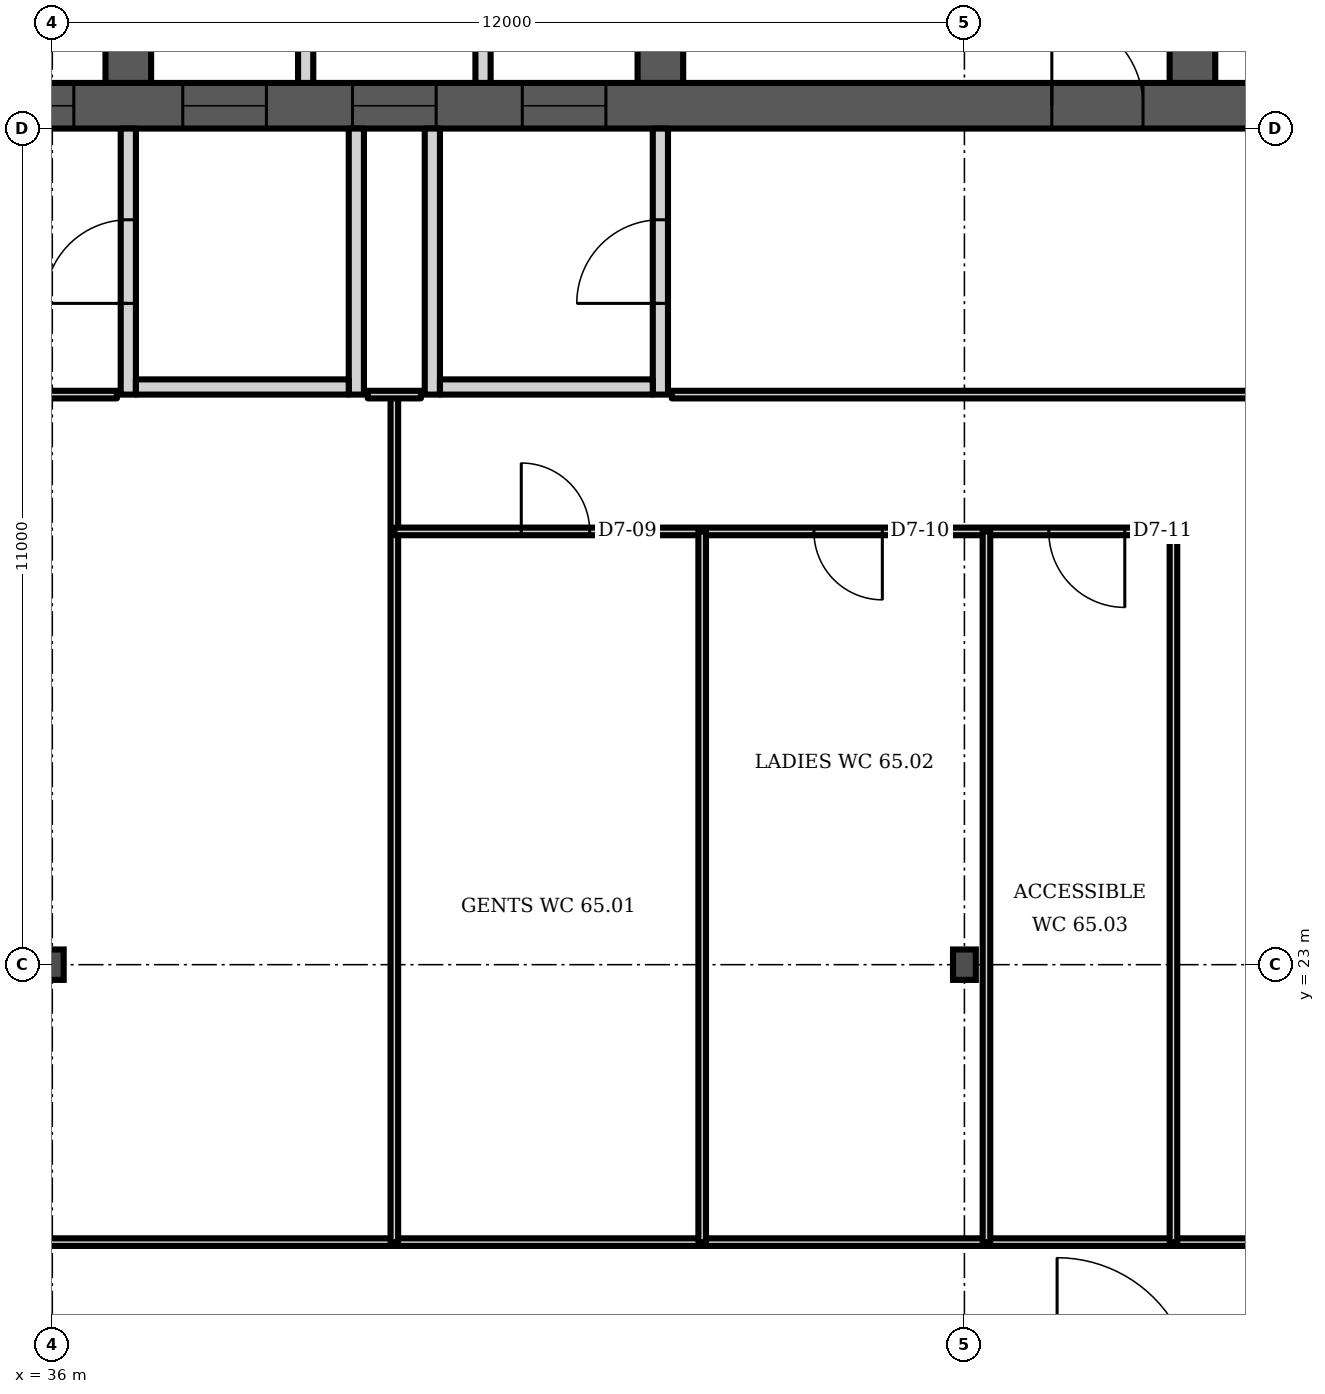
"""IFC4 building model, lengths in metres.
Left out: names, types, materials, properties, quantities, classifications, styles, units other than length and angle.
Written with IfcOpenShell. Run it as: python <this file> out.ifc"""

import sys

from ifc_helpers import new_model, si_unit, direction, frame, frame_2d, origin, origin_2d, place, context, subcontext, project, spatial, polyline, rectangle, i_section, outline, extrude, element, fill, save


model = new_model("IFC4")
c1 = context("Model", 3, precision=1e-05, world=origin(), true_north=direction((0.0, 1.0)))
c2 = subcontext(c1, "Body", "Model", "MODEL_VIEW")
j1 = project(units=[si_unit("LENGTHUNIT", "METRE"), si_unit("PLANEANGLEUNIT", "RADIAN")], contexts=[c1])
p1 = place(None, origin())
s1 = spatial("IfcSite", under=j1, at=p1, CompositionType="ELEMENT")
p2 = place(p1, origin())
s2 = spatial("IfcBuilding", under=s1, at=p2, CompositionType="ELEMENT")
p3 = place(p2, frame((0.0, 0.0, 257.5)))
s3 = spatial("IfcBuildingStorey", under=s2, at=p3, CompositionType="ELEMENT", Elevation=257.5)
p4 = place(p3, frame((23.0, 34.3, 0.0), z_axis=(0.0, 0.0, 1.0), x_axis=(1.0, 0.0, 0.0)))
e1 = element("IfcWall", 1, at=p4, inside=s3, PredefinedType="SHEAR", context=c2, shape_type="SweptSolid", body=[
    extrude(rectangle(XDim=35.0, YDim=0.6, at=frame_2d((17.5, 0.0))), origin(), (0.0, 0.0, 1.0), 3.6),
])
p5 = place(p4, frame((0.65, 0.0, 0.0)))
e2 = element("IfcOpeningElement", 2, at=p5, cuts=e1, PredefinedType="OPENING", context=c2, shape_type="SweptSolid", body=[
    extrude(rectangle(XDim=1.2, YDim=2.1, at=frame_2d((0.6, 1.05))), frame((0.0, 0.31, 0.0), z_axis=(0.0, -1.0, 0.0), x_axis=(1.0, 0.0, 0.0)), (0.0, 0.0, 1.0), 0.62),
])
p6 = place(p4, frame((7.717, 0.0, 0.0)))
e3 = element("IfcOpeningElement", 3, at=p6, cuts=e1, PredefinedType="OPENING", context=c2, shape_type="SweptSolid", body=[
    extrude(rectangle(XDim=1.1, YDim=2.1, at=frame_2d((0.55, 1.05))), frame((0.0, 0.31, 0.0), z_axis=(0.0, -1.0, 0.0), x_axis=(1.0, 0.0, 0.0)), (0.0, 0.0, 1.0), 0.62),
])
p7 = place(p4, frame((12.183, 0.0, 0.0)))
e4 = element("IfcOpeningElement", 4, at=p7, cuts=e1, PredefinedType="OPENING", context=c2, shape_type="SweptSolid", body=[
    extrude(rectangle(XDim=1.1, YDim=2.1, at=frame_2d((0.55, 1.05))), frame((0.0, 0.31, 0.0), z_axis=(0.0, -1.0, 0.0), x_axis=(1.0, 0.0, 0.0)), (0.0, 0.0, 1.0), 0.62),
])
p8 = place(p4, frame((9.8, 0.0, 0.0)))
e5 = element("IfcOpeningElement", 5, at=p8, cuts=e1, PredefinedType="OPENING", context=c2, shape_type="SweptSolid", body=[
    extrude(rectangle(XDim=1.4, YDim=2.1, at=frame_2d((0.7, 1.05))), frame((0.0, 0.31, 0.0), z_axis=(0.0, -1.0, 0.0), x_axis=(1.0, 0.0, 0.0)), (0.0, 0.0, 1.0), 0.62),
])
p9 = place(p4, frame((14.717, 0.0, 0.0)))
e6 = element("IfcOpeningElement", 6, at=p9, cuts=e1, PredefinedType="OPENING", context=c2, shape_type="SweptSolid", body=[
    extrude(rectangle(XDim=1.1, YDim=2.1, at=frame_2d((0.55, 1.05))), frame((0.0, 0.31, 0.0), z_axis=(0.0, -1.0, 0.0), x_axis=(1.0, 0.0, 0.0)), (0.0, 0.0, 1.0), 0.62),
])
p10 = place(p4, frame((16.95, 0.0, 0.0)))
e7 = element("IfcOpeningElement", 7, at=p10, cuts=e1, PredefinedType="OPENING", context=c2, shape_type="SweptSolid", body=[
    extrude(rectangle(XDim=1.1, YDim=2.1, at=frame_2d((0.55, 1.05))), frame((0.0, 0.31, 0.0), z_axis=(0.0, -1.0, 0.0), x_axis=(1.0, 0.0, 0.0)), (0.0, 0.0, 1.0), 0.62),
])
p11 = place(p4, frame((19.183, 0.0, 0.0)))
e8 = element("IfcOpeningElement", 8, at=p11, cuts=e1, PredefinedType="OPENING", context=c2, shape_type="SweptSolid", body=[
    extrude(rectangle(XDim=1.1, YDim=2.1, at=frame_2d((0.55, 1.05))), frame((0.0, 0.31, 0.0), z_axis=(0.0, -1.0, 0.0), x_axis=(1.0, 0.0, 0.0)), (0.0, 0.0, 1.0), 0.62),
])
p12 = place(p4, frame((26.15, 0.0, 0.0)))
e9 = element("IfcOpeningElement", 9, at=p12, cuts=e1, PredefinedType="OPENING", context=c2, shape_type="SweptSolid", body=[
    extrude(rectangle(XDim=1.2, YDim=2.1, at=frame_2d((0.6, 1.05))), frame((0.0, 0.31, 0.0), z_axis=(0.0, -1.0, 0.0), x_axis=(1.0, 0.0, 0.0)), (0.0, 0.0, 1.0), 0.62),
])
p13 = place(p4, frame((30.8, 0.0, 0.0)))
e10 = element("IfcOpeningElement", 10, at=p13, cuts=e1, PredefinedType="OPENING", context=c2, shape_type="SweptSolid", body=[
    extrude(rectangle(XDim=1.4, YDim=2.1, at=frame_2d((0.7, 1.05))), frame((0.0, 0.31, 0.0), z_axis=(0.0, -1.0, 0.0), x_axis=(1.0, 0.0, 0.0)), (0.0, 0.0, 1.0), 0.62),
])
p14 = place(p3, frame((37.0, 34.6, 0.0), z_axis=(0.0, 0.0, 1.0), x_axis=(0.0, 1.0, 0.0)))
e11 = element("IfcWall", 11, at=p14, inside=s3, PredefinedType="SHEAR", context=c2, shape_type="SweptSolid", body=[
    extrude(rectangle(XDim=14.784, YDim=0.6, at=frame_2d((7.392, 0.0))), origin(), (0.0, 0.0, 1.0), 3.6),
])
p15 = place(p14, frame((11.302, 0.0, 0.0)))
e12 = element("IfcOpeningElement", 12, at=p15, cuts=e11, PredefinedType="OPENING", context=c2, shape_type="SweptSolid", body=[
    extrude(rectangle(XDim=1.0, YDim=2.1, at=frame_2d((0.5, 1.05))), frame((0.0, 0.31, 0.0), z_axis=(0.0, -1.0, 0.0), x_axis=(1.0, 0.0, 0.0)), (0.0, 0.0, 1.0), 0.62),
])
p16 = place(p14, frame((3.8, 0.0, 0.0)))
e13 = element("IfcOpeningElement", 13, at=p16, cuts=e11, PredefinedType="OPENING", context=c2, shape_type="SweptSolid", body=[
    extrude(rectangle(XDim=1.1, YDim=2.1, at=frame_2d((0.55, 1.05))), frame((0.0, 0.31, 0.0), z_axis=(0.0, -1.0, 0.0), x_axis=(1.0, 0.0, 0.0)), (0.0, 0.0, 1.0), 0.62),
])
p17 = place(p3, frame((44.0, 34.6, 0.0), z_axis=(0.0, 0.0, 1.0), x_axis=(0.0, 1.0, 0.0)))
e14 = element("IfcWall", 14, at=p17, inside=s3, PredefinedType="SHEAR", context=c2, shape_type="SweptSolid", body=[
    extrude(rectangle(XDim=14.784, YDim=0.6, at=frame_2d((7.392, 0.0))), origin(), (0.0, 0.0, 1.0), 3.6),
])
p18 = place(p17, frame((11.608, 0.0, 0.0)))
e15 = element("IfcOpeningElement", 15, at=p18, cuts=e14, PredefinedType="OPENING", context=c2, shape_type="SweptSolid", body=[
    extrude(rectangle(XDim=1.0, YDim=2.1, at=frame_2d((0.5, 1.05))), frame((0.0, 0.31, 0.0), z_axis=(0.0, -1.0, 0.0), x_axis=(1.0, 0.0, 0.0)), (0.0, 0.0, 1.0), 0.62),
])
p19 = place(p17, frame((3.8, 0.0, 0.0)))
e16 = element("IfcOpeningElement", 16, at=p19, cuts=e14, PredefinedType="OPENING", context=c2, shape_type="SweptSolid", body=[
    extrude(rectangle(XDim=1.1, YDim=2.1, at=frame_2d((0.55, 1.05))), frame((0.0, 0.31, 0.0), z_axis=(0.0, -1.0, 0.0), x_axis=(1.0, 0.0, 0.0)), (0.0, 0.0, 1.0), 0.62),
])
p20 = place(p3, frame((51.0, 34.6, 0.0), z_axis=(0.0, 0.0, 1.0), x_axis=(0.0, 1.0, 0.0)))
e17 = element("IfcWall", 17, at=p20, inside=s3, PredefinedType="SHEAR", context=c2, shape_type="SweptSolid", body=[
    extrude(rectangle(XDim=14.171, YDim=0.6, at=frame_2d((7.085, 0.0))), origin(), (0.0, 0.0, 1.0), 3.6),
])
p21 = place(p20, frame((3.8, 0.0, 0.0)))
e18 = element("IfcOpeningElement", 18, at=p21, cuts=e17, PredefinedType="OPENING", context=c2, shape_type="SweptSolid", body=[
    extrude(rectangle(XDim=1.1, YDim=2.1, at=frame_2d((0.55, 1.05))), frame((0.0, 0.31, 0.0), z_axis=(0.0, -1.0, 0.0), x_axis=(1.0, 0.0, 0.0)), (0.0, 0.0, 1.0), 0.62),
])
for number, where, z_axis, x_axis in (
    (19, (36.0, 23.0, 0.0), (0.0, 0.0, 1.0), (1.0, 0.0, 0.0)),
    (20, (48.0, 23.0, 0.0), (0.0, 0.0, 1.0), (1.0, 0.0, 0.0)),
):
    element("IfcColumn", number, at=place(p3, frame(where, z_axis=z_axis, x_axis=x_axis)), inside=s3, PredefinedType="COLUMN", context=c2, shape_type="SweptSolid", body=[
        extrude(i_section(OverallWidth=0.3, OverallDepth=0.4, WebThickness=0.013, FlangeThickness=0.024, FilletRadius=0.027, at=origin_2d()), origin(), (0.0, 0.0, 1.0), 3.6),
    ])
p22 = place(p3, frame((0.0, 0.0, -0.0)))
e21 = element("IfcWall", 21, at=p22, inside=s3, PredefinedType="PARTITIONING", context=c2, shape_type="SweptSolid", body=[
    extrude(outline(polyline([(34.567, 37.65), (34.767, 37.65), (36.7, 37.65), (36.7, 37.45), (34.767, 37.45), (34.767, 34.6), (34.567, 34.6), (34.567, 37.65)])), origin(), (0.0, 0.0, 1.0), 3.2),
])
p23 = place(p3, frame((0.0, 0.0, -0.0)))
e22 = element("IfcWall", 22, at=p23, inside=s3, PredefinedType="PARTITIONING", context=c2, shape_type="SweptSolid", body=[
    extrude(outline(polyline([(41.567, 37.1), (39.433, 37.1), (39.433, 34.6), (39.233, 34.6), (39.233, 37.45), (37.3, 37.45), (37.3, 37.65), (39.233, 37.65), (39.433, 37.65), (39.433, 37.3), (41.567, 37.3), (41.567, 37.35), (41.767, 37.35), (43.7, 37.35), (43.7, 37.15), (41.767, 37.15), (41.767, 34.6), (41.567, 34.6), (41.567, 37.1)])), origin(), (0.0, 0.0, 1.0), 3.2),
])
p24 = place(p3, frame((37.0, 30.5, 0.0), z_axis=(0.0, 0.0, 1.0), x_axis=(0.0, 1.0, 0.0)))
e23 = element("IfcWall", 23, at=p24, inside=s3, PredefinedType="PARTITIONING", context=c2, shape_type="SweptSolid", body=[
    extrude(rectangle(XDim=3.5, YDim=0.2, at=frame_2d((1.75, 0.0))), origin(), (0.0, 0.0, 1.0), 3.2),
])
p25 = place(p24, frame((1.2, 0.0, 0.0)))
e24 = element("IfcOpeningElement", 24, at=p25, cuts=e23, PredefinedType="OPENING", context=c2, shape_type="SweptSolid", body=[
    extrude(rectangle(XDim=1.1, YDim=2.1, at=frame_2d((0.55, 1.05))), frame((0.0, 0.11, 0.0), z_axis=(0.0, -1.0, 0.0), x_axis=(1.0, 0.0, 0.0)), (0.0, 0.0, 1.0), 0.22),
])
p26 = place(p3, frame((40.0, 30.5, 0.0), z_axis=(0.0, 0.0, 1.0), x_axis=(0.0, 1.0, 0.0)))
e25 = element("IfcWall", 25, at=p26, inside=s3, PredefinedType="PARTITIONING", context=c2, shape_type="SweptSolid", body=[
    extrude(rectangle(XDim=3.5, YDim=0.2, at=frame_2d((1.75, 0.0))), origin(), (0.0, 0.0, 1.0), 3.2),
])
p27 = place(p3, frame((37.1, 30.6, 0.0), z_axis=(0.0, 0.0, 1.0), x_axis=(1.0, 0.0, 0.0)))
e26 = element("IfcWall", 26, at=p27, inside=s3, PredefinedType="PARTITIONING", context=c2, shape_type="SweptSolid", body=[
    extrude(rectangle(XDim=2.8, YDim=0.2, at=frame_2d((1.4, 0.0))), origin(), (0.0, 0.0, 1.0), 3.2),
])
p28 = place(p3, frame((41.0, 30.5, 0.0), z_axis=(0.0, 0.0, 1.0), x_axis=(0.0, 1.0, 0.0)))
e27 = element("IfcWall", 27, at=p28, inside=s3, PredefinedType="PARTITIONING", context=c2, shape_type="SweptSolid", body=[
    extrude(rectangle(XDim=3.5, YDim=0.2, at=frame_2d((1.75, 0.0))), origin(), (0.0, 0.0, 1.0), 3.2),
])
p29 = place(p3, frame((44.0, 30.5, 0.0), z_axis=(0.0, 0.0, 1.0), x_axis=(0.0, 1.0, 0.0)))
e28 = element("IfcWall", 28, at=p29, inside=s3, PredefinedType="PARTITIONING", context=c2, shape_type="SweptSolid", body=[
    extrude(rectangle(XDim=3.5, YDim=0.2, at=frame_2d((1.75, 0.0))), origin(), (0.0, 0.0, 1.0), 3.2),
])
p30 = place(p29, frame((1.2, 0.0, 0.0)))
e29 = element("IfcOpeningElement", 29, at=p30, cuts=e28, PredefinedType="OPENING", context=c2, shape_type="SweptSolid", body=[
    extrude(rectangle(XDim=1.1, YDim=2.1, at=frame_2d((0.55, 1.05))), frame((0.0, 0.11, 0.0), z_axis=(0.0, -1.0, 0.0), x_axis=(1.0, 0.0, 0.0)), (0.0, 0.0, 1.0), 0.22),
])
p31 = place(p3, frame((41.1, 30.6, 0.0), z_axis=(0.0, 0.0, 1.0), x_axis=(1.0, 0.0, 0.0)))
e30 = element("IfcWall", 30, at=p31, inside=s3, PredefinedType="PARTITIONING", context=c2, shape_type="SweptSolid", body=[
    extrude(rectangle(XDim=2.8, YDim=0.2, at=frame_2d((1.4, 0.0))), origin(), (0.0, 0.0, 1.0), 3.2),
])
p32 = place(p3, frame((23.0, 30.5, 0.0), z_axis=(0.0, 0.0, 1.0), x_axis=(1.0, 0.0, 0.0)))
e31 = element("IfcWall", 31, at=p32, inside=s3, PredefinedType="PARTITIONING", context=c2, shape_type="SweptSolid", body=[
    extrude(rectangle(XDim=13.85, YDim=0.1, at=frame_2d((6.925, 0.0))), origin(), (0.0, 0.0, 1.0), 3.2),
])
p33 = place(p32, frame((7.545, 0.0, 0.0)))
e32 = element("IfcOpeningElement", 32, at=p33, cuts=e31, PredefinedType="OPENING", context=c2, shape_type="SweptSolid", body=[
    extrude(rectangle(XDim=1.0, YDim=2.1, at=frame_2d((0.5, 1.05))), frame((0.0, 0.06, 0.0), z_axis=(0.0, -1.0, 0.0), x_axis=(1.0, 0.0, 0.0)), (0.0, 0.0, 1.0), 0.12),
])
p34 = place(p3, frame((25.125, 19.35, 0.0), z_axis=(0.0, 0.0, 1.0), x_axis=(1.0, 0.0, 0.0)))
e33 = element("IfcWall", 33, at=p34, inside=s3, PredefinedType="PARTITIONING", context=c2, shape_type="SweptSolid", body=[
    extrude(rectangle(XDim=31.475, YDim=0.1, at=frame_2d((15.738, 0.0))), origin(), (0.0, 0.0, 1.0), 3.2),
])
p35 = place(p3, frame((40.5, 19.35, 0.0), z_axis=(0.0, 0.0, 1.0), x_axis=(0.0, 1.0, 0.0)))
e34 = element("IfcWall", 34, at=p35, inside=s3, PredefinedType="PARTITIONING", context=c2, shape_type="SweptSolid", body=[
    extrude(rectangle(XDim=11.14, YDim=0.1, at=frame_2d((5.57, 0.0))), origin(), (0.0, 0.0, 1.0), 3.2),
])
p36 = place(p3, frame((40.5, 28.7, 0.0), z_axis=(0.0, 0.0, 1.0), x_axis=(1.0, 0.0, 0.0)))
e35 = element("IfcWall", 35, at=p36, inside=s3, PredefinedType="PARTITIONING", context=c2, shape_type="SweptSolid", body=[
    extrude(rectangle(XDim=10.25, YDim=0.1, at=frame_2d((5.125, 0.0))), origin(), (0.0, 0.0, 1.0), 3.2),
])
p37 = place(p36, frame((1.67, 0.0, 0.0)))
e36 = element("IfcOpeningElement", 36, at=p37, cuts=e35, PredefinedType="OPENING", context=c2, shape_type="SweptSolid", body=[
    extrude(rectangle(XDim=0.9, YDim=2.1, at=frame_2d((0.45, 1.05))), frame((0.0, 0.06, 0.0), z_axis=(0.0, -1.0, 0.0), x_axis=(1.0, 0.0, 0.0)), (0.0, 0.0, 1.0), 0.12),
])
p38 = place(p36, frame((5.52, 0.0, 0.0)))
e37 = element("IfcOpeningElement", 37, at=p38, cuts=e35, PredefinedType="OPENING", context=c2, shape_type="SweptSolid", body=[
    extrude(rectangle(XDim=0.9, YDim=2.1, at=frame_2d((0.45, 1.05))), frame((0.0, 0.06, 0.0), z_axis=(0.0, -1.0, 0.0), x_axis=(1.0, 0.0, 0.0)), (0.0, 0.0, 1.0), 0.12),
])
p39 = place(p36, frame((8.61, 0.0, 0.0)))
e38 = element("IfcOpeningElement", 38, at=p39, cuts=e35, PredefinedType="OPENING", context=c2, shape_type="SweptSolid", body=[
    extrude(rectangle(XDim=1.0, YDim=2.1, at=frame_2d((0.5, 1.05))), frame((0.0, 0.06, 0.0), z_axis=(0.0, -1.0, 0.0), x_axis=(1.0, 0.0, 0.0)), (0.0, 0.0, 1.0), 0.12),
])
for number, where, z_axis, x_axis in (
    (39, (44.55, 19.35, 0.0), (0.0, 0.0, 1.0), (0.0, 1.0, 0.0)),
    (40, (48.29, 19.35, 0.0), (0.0, 0.0, 1.0), (0.0, 1.0, 0.0)),
    (41, (50.75, 19.35, 0.0), (0.0, 0.0, 1.0), (0.0, 1.0, 0.0)),
):
    element("IfcWall", number, at=place(p3, frame(where, z_axis=z_axis, x_axis=x_axis)), inside=s3, PredefinedType="PARTITIONING", context=c2, shape_type="SweptSolid", body=[
        extrude(rectangle(XDim=9.35, YDim=0.1, at=frame_2d((4.675, 0.0))), origin(), (0.0, 0.0, 1.0), 3.2),
    ])
p40 = place(p3, frame((40.15, 30.5, 0.0), z_axis=(0.0, 0.0, 1.0), x_axis=(1.0, 0.0, 0.0)))
e42 = element("IfcWall", 42, at=p40, inside=s3, PredefinedType="PARTITIONING", context=c2, shape_type="SweptSolid", body=[
    extrude(rectangle(XDim=0.7, YDim=0.1, at=frame_2d((0.35, 0.0))), origin(), (0.0, 0.0, 1.0), 3.2),
])
p41 = place(p3, frame((44.15, 30.5, 0.0), z_axis=(0.0, 0.0, 1.0), x_axis=(1.0, 0.0, 0.0)))
e43 = element("IfcWall", 43, at=p41, inside=s3, PredefinedType="PARTITIONING", context=c2, shape_type="SweptSolid", body=[
    extrude(rectangle(XDim=12.45, YDim=0.1, at=frame_2d((6.225, 0.0))), origin(), (0.0, 0.0, 1.0), 3.2),
])
p42 = place(p7, origin())
e44 = element("IfcDoor", 44, at=p42, inside=s3, OperationType="DOUBLE_DOOR_SLIDING", PredefinedType="DOOR", context=c2, shape_type="SweptSolid", body=[
    extrude(rectangle(XDim=1.1, YDim=2.1, at=frame_2d((0.55, 1.05))), frame((0.0, 0.025, 0.0), z_axis=(0.0, -1.0, 0.0), x_axis=(1.0, 0.0, 0.0)), (0.0, 0.0, 1.0), 0.05),
])
fill(e4, e44)
p43 = place(p9, origin())
e45 = element("IfcDoor", 45, at=p43, inside=s3, OperationType="DOUBLE_DOOR_SLIDING", PredefinedType="DOOR", context=c2, shape_type="SweptSolid", body=[
    extrude(rectangle(XDim=1.1, YDim=2.1, at=frame_2d((0.55, 1.05))), frame((0.0, 0.025, 0.0), z_axis=(0.0, -1.0, 0.0), x_axis=(1.0, 0.0, 0.0)), (0.0, 0.0, 1.0), 0.05),
])
fill(e6, e45)
p44 = place(p10, origin())
e46 = element("IfcDoor", 46, at=p44, inside=s3, OperationType="DOUBLE_DOOR_SLIDING", PredefinedType="DOOR", context=c2, shape_type="SweptSolid", body=[
    extrude(rectangle(XDim=1.1, YDim=2.1, at=frame_2d((0.55, 1.05))), frame((0.0, 0.025, 0.0), z_axis=(0.0, -1.0, 0.0), x_axis=(1.0, 0.0, 0.0)), (0.0, 0.0, 1.0), 0.05),
])
fill(e7, e46)
p45 = place(p11, origin())
e47 = element("IfcDoor", 47, at=p45, inside=s3, OperationType="DOUBLE_DOOR_SLIDING", PredefinedType="DOOR", context=c2, shape_type="SweptSolid", body=[
    extrude(rectangle(XDim=1.1, YDim=2.1, at=frame_2d((0.55, 1.05))), frame((0.0, 0.025, 0.0), z_axis=(0.0, -1.0, 0.0), x_axis=(1.0, 0.0, 0.0)), (0.0, 0.0, 1.0), 0.05),
])
fill(e8, e47)
p46 = place(p12, origin())
e48 = element("IfcDoor", 48, at=p46, inside=s3, OperationType="SINGLE_SWING_LEFT", PredefinedType="DOOR", context=c2, shape_type="SweptSolid", body=[
    extrude(rectangle(XDim=1.2, YDim=2.1, at=frame_2d((0.6, 1.05))), frame((0.0, 0.025, 0.0), z_axis=(0.0, -1.0, 0.0), x_axis=(1.0, 0.0, 0.0)), (0.0, 0.0, 1.0), 0.05),
])
fill(e9, e48)
p47 = place(p25, origin())
e49 = element("IfcDoor", 49, at=p47, inside=s3, OperationType="SINGLE_SWING_LEFT", PredefinedType="DOOR", context=c2, shape_type="SweptSolid", body=[
    extrude(rectangle(XDim=1.1, YDim=2.1, at=frame_2d((0.55, 1.05))), frame((0.0, 0.025, 0.0), z_axis=(0.0, -1.0, 0.0), x_axis=(1.0, 0.0, 0.0)), (0.0, 0.0, 1.0), 0.05),
])
fill(e24, e49)
p48 = place(p30, origin())
e50 = element("IfcDoor", 50, at=p48, inside=s3, OperationType="SINGLE_SWING_LEFT", PredefinedType="DOOR", context=c2, shape_type="SweptSolid", body=[
    extrude(rectangle(XDim=1.1, YDim=2.1, at=frame_2d((0.55, 1.05))), frame((0.0, 0.025, 0.0), z_axis=(0.0, -1.0, 0.0), x_axis=(1.0, 0.0, 0.0)), (0.0, 0.0, 1.0), 0.05),
])
fill(e29, e50)
p49 = place(p37, origin())
e51 = element("IfcDoor", 51, at=p49, inside=s3, OperationType="SINGLE_SWING_LEFT", PredefinedType="DOOR", context=c2, shape_type="SweptSolid", body=[
    extrude(rectangle(XDim=0.9, YDim=2.1, at=frame_2d((0.45, 1.05))), frame((0.0, 0.025, 0.0), z_axis=(0.0, -1.0, 0.0), x_axis=(1.0, 0.0, 0.0)), (0.0, 0.0, 1.0), 0.05),
])
fill(e36, e51)
p50 = place(p38, origin())
e52 = element("IfcDoor", 52, at=p50, inside=s3, OperationType="SINGLE_SWING_RIGHT", PredefinedType="DOOR", context=c2, shape_type="SweptSolid", body=[
    extrude(rectangle(XDim=0.9, YDim=2.1, at=frame_2d((0.45, 1.05))), frame((0.0, 0.025, 0.0), z_axis=(0.0, -1.0, 0.0), x_axis=(1.0, 0.0, 0.0)), (0.0, 0.0, 1.0), 0.05),
])
fill(e37, e52)
p51 = place(p39, origin())
e53 = element("IfcDoor", 53, at=p51, inside=s3, OperationType="SINGLE_SWING_RIGHT", PredefinedType="DOOR", context=c2, shape_type="SweptSolid", body=[
    extrude(rectangle(XDim=1.0, YDim=2.1, at=frame_2d((0.5, 1.05))), frame((0.0, 0.025, 0.0), z_axis=(0.0, -1.0, 0.0), x_axis=(1.0, 0.0, 0.0)), (0.0, 0.0, 1.0), 0.05),
])
fill(e38, e53)
save(model, sys.argv[1])
